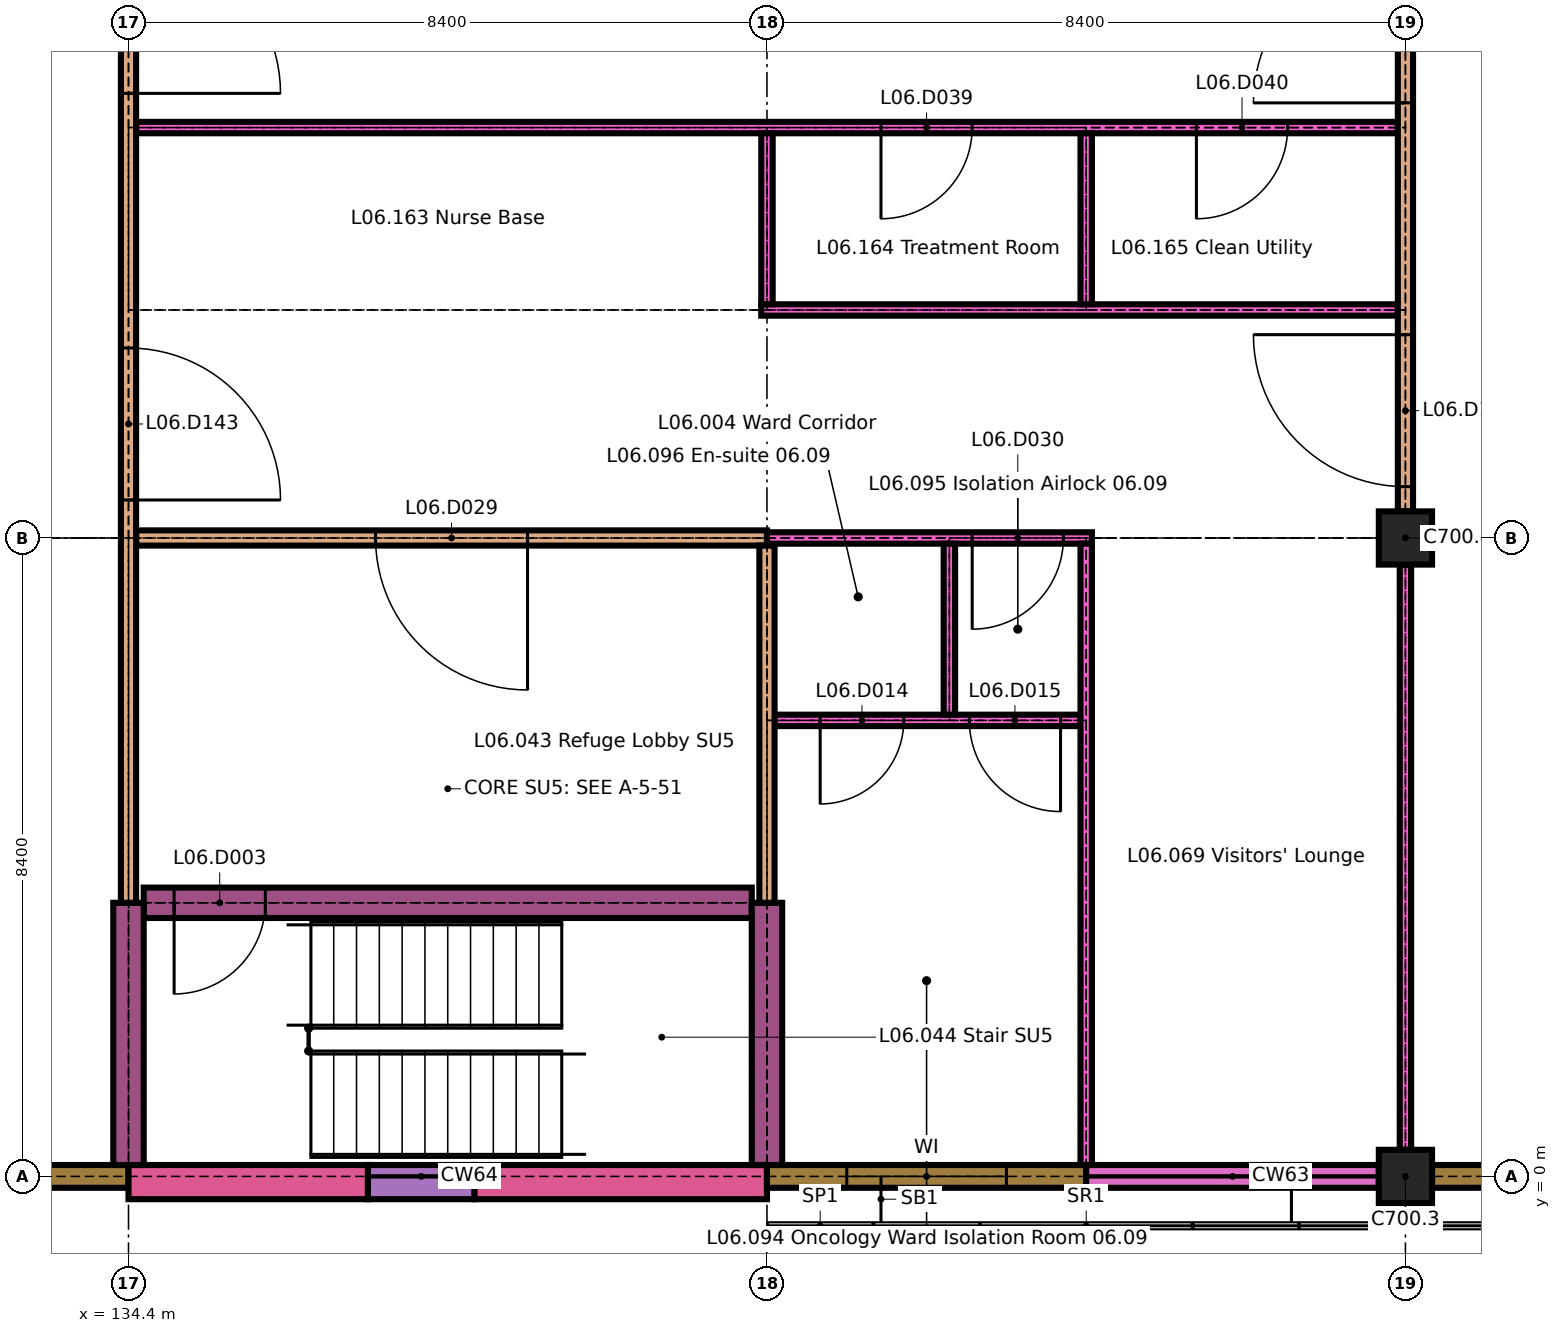
"""IFC4 building model, lengths in metres.
Left out: names, types, materials, properties, quantities, classifications, styles, units other than length and angle.
Written with IfcOpenShell. Run it as: python <this file> out.ifc"""

import sys

from ifc_helpers import new_model, si_unit, direction, frame, frame_2d, origin, origin_2d, place, context, subcontext, project, spatial, rectangle, extrude, element, fill, save


model = new_model("IFC4")
c1 = context("Model", 3, precision=1e-05, world=origin(), true_north=direction((0.0, 1.0)))
c2 = subcontext(c1, "Body", "Model", "MODEL_VIEW")
j1 = project(units=[si_unit("LENGTHUNIT", "METRE"), si_unit("PLANEANGLEUNIT", "RADIAN")], contexts=[c1])
p1 = place(None, origin())
s1 = spatial("IfcSite", under=j1, at=p1, CompositionType="ELEMENT")
p2 = place(p1, origin())
s2 = spatial("IfcBuilding", under=s1, at=p2, CompositionType="ELEMENT")
p3 = place(p2, frame((0.0, 0.0, 26.1)))
s3 = spatial("IfcBuildingStorey", under=s2, at=p3, CompositionType="ELEMENT", Elevation=26.1)
p4 = place(p3, frame((151.2, 0.0, 0.0), z_axis=(0.0, 0.0, 1.0), x_axis=(1.0, 0.0, 0.0)))
e1 = element("IfcColumn", 1, at=p4, inside=s3, PredefinedType="COLUMN", context=c2, shape_type="SweptSolid", body=[
    extrude(rectangle(XDim=0.7, YDim=0.7, at=origin_2d()), origin(), (0.0, 0.0, 1.0), 3.2),
])
p5 = place(p3, frame((151.2, 8.4, 0.0), z_axis=(0.0, 0.0, 1.0), x_axis=(1.0, 0.0, 0.0)))
e2 = element("IfcColumn", 2, at=p5, inside=s3, PredefinedType="COLUMN", context=c2, shape_type="SweptSolid", body=[
    extrude(rectangle(XDim=0.7, YDim=0.7, at=origin_2d()), origin(), (0.0, 0.0, 1.0), 3.3),
])
p6 = place(p3, frame((133.1, 0.0, 0.0), z_axis=(0.0, 0.0, 1.0), x_axis=(1.0, 0.0, 0.0)))
e3 = element("IfcWall", 3, at=p6, inside=s3, PredefinedType="SOLIDWALL", context=c2, shape_type="SweptSolid", body=[
    extrude(rectangle(XDim=1.3, YDim=0.3, at=frame_2d((0.65, 0.0))), origin(), (0.0, 0.0, 1.0), 2.9),
])
p7 = place(p3, frame((134.4, -0.075, 0.0), z_axis=(0.0, 0.0, 1.0), x_axis=(1.0, 0.0, 0.0)))
e4 = element("IfcWall", 4, at=p7, inside=s3, PredefinedType="SOLIDWALL", context=c2, shape_type="SweptSolid", body=[
    extrude(rectangle(XDim=3.15, YDim=0.45, at=frame_2d((1.575, 0.0))), origin(), (0.0, 0.0, 1.0), 3.3),
])
p8 = place(p3, frame((138.95, -0.075, 0.0), z_axis=(0.0, 0.0, 1.0), x_axis=(1.0, 0.0, 0.0)))
e5 = element("IfcWall", 5, at=p8, inside=s3, PredefinedType="SOLIDWALL", context=c2, shape_type="SweptSolid", body=[
    extrude(rectangle(XDim=3.85, YDim=0.45, at=frame_2d((1.925, 0.0))), origin(), (0.0, 0.0, 1.0), 3.3),
])
p9 = place(p3, frame((137.55, -0.075, 0.0), z_axis=(0.0, 0.0, 1.0), x_axis=(1.0, 0.0, 0.0)))
e6 = element("IfcWall", 6, at=p9, inside=s3, PredefinedType="SOLIDWALL", context=c2, shape_type="SweptSolid", body=[
    extrude(rectangle(XDim=1.4, YDim=0.45, at=frame_2d((0.7, 0.0))), origin(), (0.0, 0.0, 1.0), 0.6),
])
p10 = place(p3, frame((142.8, 0.0, 0.0), z_axis=(0.0, 0.0, 1.0), x_axis=(1.0, 0.0, 0.0)))
e7 = element("IfcWall", 7, at=p10, inside=s3, PredefinedType="SOLIDWALL", context=c2, shape_type="SweptSolid", body=[
    extrude(rectangle(XDim=4.2, YDim=0.3, at=frame_2d((2.1, 0.0))), origin(), (0.0, 0.0, 1.0), 2.9),
])
p11 = place(p10, frame((1.05, 0.0, 0.9)))
e8 = element("IfcOpeningElement", 8, at=p11, cuts=e7, PredefinedType="OPENING", context=c2, shape_type="SweptSolid", body=[
    extrude(rectangle(XDim=2.1, YDim=1.5, at=frame_2d((1.05, 0.75))), frame((0.0, 0.16, 0.0), z_axis=(0.0, -1.0, 0.0), x_axis=(1.0, 0.0, 0.0)), (0.0, 0.0, 1.0), 0.32),
])
p12 = place(p3, frame((147.0, 0.0, 0.0), z_axis=(0.0, 0.0, 1.0), x_axis=(1.0, 0.0, 0.0)))
e9 = element("IfcWall", 9, at=p12, inside=s3, PredefinedType="SOLIDWALL", context=c2, shape_type="SweptSolid", body=[
    extrude(rectangle(XDim=3.85, YDim=0.3, at=frame_2d((1.925, 0.0))), origin(), (0.0, 0.0, 1.0), 0.6),
])
p13 = place(p3, frame((151.55, 0.0, 0.0), z_axis=(0.0, 0.0, 1.0), x_axis=(1.0, 0.0, 0.0)))
e10 = element("IfcWall", 10, at=p13, inside=s3, PredefinedType="SOLIDWALL", context=c2, shape_type="SweptSolid", body=[
    extrude(rectangle(XDim=1.05, YDim=0.3, at=frame_2d((0.525, 0.0))), origin(), (0.0, 0.0, 1.0), 2.9),
])
p14 = place(p3, frame((134.6, 3.6, 0.0), z_axis=(0.0, 0.0, 1.0), x_axis=(1.0, 0.0, 0.0)))
e11 = element("IfcWall", 11, at=p14, inside=s3, PredefinedType="SHEAR", context=c2, shape_type="SweptSolid", body=[
    extrude(rectangle(XDim=8.0, YDim=0.4, at=frame_2d((4.0, 0.0))), origin(), (0.0, 0.0, 1.0), 3.3),
])
p15 = place(p14, frame((0.4, 0.0, 0.0)))
e12 = element("IfcOpeningElement", 12, at=p15, cuts=e11, PredefinedType="OPENING", context=c2, shape_type="SweptSolid", body=[
    extrude(rectangle(XDim=1.2, YDim=2.1, at=frame_2d((0.6, 1.05))), frame((0.0, 0.21, 0.0), z_axis=(0.0, -1.0, 0.0), x_axis=(1.0, 0.0, 0.0)), (0.0, 0.0, 1.0), 0.42),
])
p16 = place(p3, frame((142.9, 6.0, 0.0), z_axis=(0.0, 0.0, 1.0), x_axis=(1.0, 0.0, 0.0)))
e13 = element("IfcWall", 13, at=p16, inside=s3, PredefinedType="PARTITIONING", context=c2, shape_type="SweptSolid", body=[
    extrude(rectangle(XDim=4.025, YDim=0.15, at=frame_2d((2.013, 0.0))), origin(), (0.0, 0.0, 1.0), 3.3),
])
p17 = place(p16, frame((0.6, 0.0, 0.0)))
e14 = element("IfcOpeningElement", 14, at=p17, cuts=e13, PredefinedType="OPENING", context=c2, shape_type="SweptSolid", body=[
    extrude(rectangle(XDim=1.1, YDim=2.1, at=frame_2d((0.55, 1.05))), frame((0.0, 0.085, 0.0), z_axis=(0.0, -1.0, 0.0), x_axis=(1.0, 0.0, 0.0)), (0.0, 0.0, 1.0), 0.17),
])
p18 = place(p16, frame((2.562, 0.0, 0.0)))
e15 = element("IfcOpeningElement", 15, at=p18, cuts=e13, PredefinedType="OPENING", context=c2, shape_type="SweptSolid", body=[
    extrude(rectangle(XDim=1.2, YDim=2.1, at=frame_2d((0.6, 1.05))), frame((0.0, 0.085, 0.0), z_axis=(0.0, -1.0, 0.0), x_axis=(1.0, 0.0, 0.0)), (0.0, 0.0, 1.0), 0.17),
])
p19 = place(p3, frame((134.5, 8.4, 0.0), z_axis=(0.0, 0.0, 1.0), x_axis=(1.0, 0.0, 0.0)))
e16 = element("IfcWall", 16, at=p19, inside=s3, PredefinedType="PARTITIONING", context=c2, shape_type="SweptSolid", body=[
    extrude(rectangle(XDim=8.3, YDim=0.2, at=frame_2d((4.15, 0.0))), origin(), (0.0, 0.0, 1.0), 3.3),
])
p20 = place(p19, frame((3.15, 0.0, 0.0)))
e17 = element("IfcOpeningElement", 17, at=p20, cuts=e16, PredefinedType="OPENING", context=c2, shape_type="SweptSolid", body=[
    extrude(rectangle(XDim=2.0, YDim=2.4, at=frame_2d((1.0, 1.2))), frame((0.0, 0.11, 0.0), z_axis=(0.0, -1.0, 0.0), x_axis=(1.0, 0.0, 0.0)), (0.0, 0.0, 1.0), 0.22),
])
p21 = place(p3, frame((142.8, 8.4, 0.0), z_axis=(0.0, 0.0, 1.0), x_axis=(1.0, 0.0, 0.0)))
e18 = element("IfcWall", 18, at=p21, inside=s3, PredefinedType="PARTITIONING", context=c2, shape_type="SweptSolid", body=[
    extrude(rectangle(XDim=4.275, YDim=0.15, at=frame_2d((2.137, 0.0))), origin(), (0.0, 0.0, 1.0), 3.3),
])
p22 = place(p21, frame((2.7, 0.0, 0.0)))
e19 = element("IfcOpeningElement", 19, at=p22, cuts=e18, PredefinedType="OPENING", context=c2, shape_type="SweptSolid", body=[
    extrude(rectangle(XDim=1.2, YDim=2.1, at=frame_2d((0.6, 1.05))), frame((0.0, 0.085, 0.0), z_axis=(0.0, -1.0, 0.0), x_axis=(1.0, 0.0, 0.0)), (0.0, 0.0, 1.0), 0.17),
])
p23 = place(p3, frame((142.725, 11.4, 0.0), z_axis=(0.0, 0.0, 1.0), x_axis=(1.0, 0.0, 0.0)))
e20 = element("IfcWall", 20, at=p23, inside=s3, PredefinedType="PARTITIONING", context=c2, shape_type="SweptSolid", body=[
    extrude(rectangle(XDim=8.375, YDim=0.15, at=frame_2d((4.188, 0.0))), origin(), (0.0, 0.0, 1.0), 3.3),
])
p24 = place(p3, frame((134.5, 13.8, 0.0), z_axis=(0.0, 0.0, 1.0), x_axis=(1.0, 0.0, 0.0)))
e21 = element("IfcWall", 21, at=p24, inside=s3, PredefinedType="PARTITIONING", context=c2, shape_type="SweptSolid", body=[
    extrude(rectangle(XDim=16.6, YDim=0.15, at=frame_2d((8.3, 0.0))), origin(), (0.0, 0.0, 1.0), 3.3),
])
p25 = place(p24, frame((9.8, 0.0, 0.0)))
e22 = element("IfcOpeningElement", 22, at=p25, cuts=e21, PredefinedType="OPENING", context=c2, shape_type="SweptSolid", body=[
    extrude(rectangle(XDim=1.2, YDim=2.1, at=frame_2d((0.6, 1.05))), frame((0.0, 0.085, 0.0), z_axis=(0.0, -1.0, 0.0), x_axis=(1.0, 0.0, 0.0)), (0.0, 0.0, 1.0), 0.17),
])
p26 = place(p24, frame((13.95, 0.0, 0.0)))
e23 = element("IfcOpeningElement", 23, at=p26, cuts=e21, PredefinedType="OPENING", context=c2, shape_type="SweptSolid", body=[
    extrude(rectangle(XDim=1.2, YDim=2.1, at=frame_2d((0.6, 1.05))), frame((0.0, 0.085, 0.0), z_axis=(0.0, -1.0, 0.0), x_axis=(1.0, 0.0, 0.0)), (0.0, 0.0, 1.0), 0.17),
])
p27 = place(p3, frame((134.4, 0.15, 0.0), z_axis=(0.0, 0.0, 1.0), x_axis=(0.0, 1.0, 0.0)))
e24 = element("IfcWall", 24, at=p27, inside=s3, PredefinedType="SHEAR", context=c2, shape_type="SweptSolid", body=[
    extrude(rectangle(XDim=3.45, YDim=0.4, at=frame_2d((1.725, 0.0))), origin(), (0.0, 0.0, 1.0), 3.3),
])
p28 = place(p3, frame((134.4, 3.6, 0.0), z_axis=(0.0, 0.0, 1.0), x_axis=(0.0, 1.0, 0.0)))
e25 = element("IfcWall", 25, at=p28, inside=s3, PredefinedType="PARTITIONING", context=c2, shape_type="SweptSolid", body=[
    extrude(rectangle(XDim=13.1, YDim=0.2, at=frame_2d((6.55, 0.0))), origin(), (0.0, 0.0, 1.0), 3.3),
])
p29 = place(p28, frame((5.3, 0.0, 0.0)))
e26 = element("IfcOpeningElement", 26, at=p29, cuts=e25, PredefinedType="OPENING", context=c2, shape_type="SweptSolid", body=[
    extrude(rectangle(XDim=2.0, YDim=2.4, at=frame_2d((1.0, 1.2))), frame((0.0, 0.11, 0.0), z_axis=(0.0, -1.0, 0.0), x_axis=(1.0, 0.0, 0.0)), (0.0, 0.0, 1.0), 0.22),
])
p30 = place(p28, frame((10.65, 0.0, 0.0)))
e27 = element("IfcOpeningElement", 27, at=p30, cuts=e25, PredefinedType="OPENING", context=c2, shape_type="SweptSolid", body=[
    extrude(rectangle(XDim=2.0, YDim=2.4, at=frame_2d((1.0, 1.2))), frame((0.0, 0.11, 0.0), z_axis=(0.0, -1.0, 0.0), x_axis=(1.0, 0.0, 0.0)), (0.0, 0.0, 1.0), 0.22),
])
p31 = place(p3, frame((142.8, 0.15, 0.0), z_axis=(0.0, 0.0, 1.0), x_axis=(0.0, 1.0, 0.0)))
e28 = element("IfcWall", 28, at=p31, inside=s3, PredefinedType="SHEAR", context=c2, shape_type="SweptSolid", body=[
    extrude(rectangle(XDim=3.45, YDim=0.4, at=frame_2d((1.725, 0.0))), origin(), (0.0, 0.0, 1.0), 3.3),
])
p32 = place(p3, frame((142.8, 3.6, 0.0), z_axis=(0.0, 0.0, 1.0), x_axis=(0.0, 1.0, 0.0)))
e29 = element("IfcWall", 29, at=p32, inside=s3, PredefinedType="PARTITIONING", context=c2, shape_type="SweptSolid", body=[
    extrude(rectangle(XDim=4.7, YDim=0.2, at=frame_2d((2.35, 0.0))), origin(), (0.0, 0.0, 1.0), 3.3),
])
for number, where, z_axis, x_axis in (
    (30, (142.8, 11.475, 0.0), (0.0, 0.0, 1.0), (0.0, 1.0, 0.0)),
    (31, (145.2, 6.075, 0.0), (0.0, 0.0, 1.0), (0.0, 1.0, 0.0)),
):
    element("IfcWall", number, at=place(p3, frame(where, z_axis=z_axis, x_axis=x_axis)), inside=s3, PredefinedType="PARTITIONING", context=c2, shape_type="SweptSolid", body=[
        extrude(rectangle(XDim=2.25, YDim=0.15, at=frame_2d((1.125, 0.0))), origin(), (0.0, 0.0, 1.0), 3.3),
    ])
p33 = place(p3, frame((147.0, 0.15, 0.0), z_axis=(0.0, 0.0, 1.0), x_axis=(0.0, 1.0, 0.0)))
e32 = element("IfcWall", 32, at=p33, inside=s3, PredefinedType="PARTITIONING", context=c2, shape_type="SweptSolid", body=[
    extrude(rectangle(XDim=8.175, YDim=0.15, at=frame_2d((4.087, 0.0))), origin(), (0.0, 0.0, 1.0), 3.3),
])
p34 = place(p3, frame((147.0, 11.475, 0.0), z_axis=(0.0, 0.0, 1.0), x_axis=(0.0, 1.0, 0.0)))
e33 = element("IfcWall", 33, at=p34, inside=s3, PredefinedType="PARTITIONING", context=c2, shape_type="SweptSolid", body=[
    extrude(rectangle(XDim=2.25, YDim=0.15, at=frame_2d((1.125, 0.0))), origin(), (0.0, 0.0, 1.0), 3.3),
])
p35 = place(p3, frame((151.2, 0.35, 0.0), z_axis=(0.0, 0.0, 1.0), x_axis=(0.0, 1.0, 0.0)))
e34 = element("IfcWall", 34, at=p35, inside=s3, PredefinedType="PARTITIONING", context=c2, shape_type="SweptSolid", body=[
    extrude(rectangle(XDim=7.7, YDim=0.15, at=frame_2d((3.85, 0.0))), origin(), (0.0, 0.0, 1.0), 3.3),
])
p36 = place(p3, frame((151.2, 8.75, 0.0), z_axis=(0.0, 0.0, 1.0), x_axis=(0.0, 1.0, 0.0)))
e35 = element("IfcWall", 35, at=p36, inside=s3, PredefinedType="PARTITIONING", context=c2, shape_type="SweptSolid", body=[
    extrude(rectangle(XDim=7.7, YDim=0.2, at=frame_2d((3.85, 0.0))), origin(), (0.0, 0.0, 1.0), 3.3),
])
p37 = place(p36, frame((0.325, 0.0, 0.0)))
e36 = element("IfcOpeningElement", 36, at=p37, cuts=e35, PredefinedType="OPENING", context=c2, shape_type="SweptSolid", body=[
    extrude(rectangle(XDim=2.0, YDim=2.4, at=frame_2d((1.0, 1.2))), frame((0.0, 0.11, 0.0), z_axis=(0.0, -1.0, 0.0), x_axis=(1.0, 0.0, 0.0)), (0.0, 0.0, 1.0), 0.22),
])
p38 = place(p36, frame((5.375, 0.0, 0.0)))
e37 = element("IfcOpeningElement", 37, at=p38, cuts=e35, PredefinedType="OPENING", context=c2, shape_type="SweptSolid", body=[
    extrude(rectangle(XDim=2.0, YDim=2.4, at=frame_2d((1.0, 1.2))), frame((0.0, 0.11, 0.0), z_axis=(0.0, -1.0, 0.0), x_axis=(1.0, 0.0, 0.0)), (0.0, 0.0, 1.0), 0.22),
])
p39 = place(p11, origin())
e38 = element("IfcWindow", 38, at=p39, inside=s3, PartitioningType="SINGLE_PANEL", PredefinedType="WINDOW", context=c2, shape_type="SweptSolid", body=[
    extrude(rectangle(XDim=2.1, YDim=1.5, at=frame_2d((1.05, 0.75))), frame((0.0, 0.045, 0.0), z_axis=(0.0, -1.0, 0.0), x_axis=(1.0, 0.0, 0.0)), (0.0, 0.0, 1.0), 0.09),
])
fill(e8, e38)
p40 = place(p15, origin())
e39 = element("IfcDoor", 39, at=p40, inside=s3, OperationType="SINGLE_SWING_LEFT", PredefinedType="DOOR", context=c2, shape_type="SweptSolid", body=[
    extrude(rectangle(XDim=1.2, YDim=2.1, at=frame_2d((0.6, 1.05))), frame((0.0, 0.025, 0.0), z_axis=(0.0, -1.0, 0.0), x_axis=(1.0, 0.0, 0.0)), (0.0, 0.0, 1.0), 0.05),
])
fill(e12, e39)
p41 = place(p17, origin())
e40 = element("IfcDoor", 40, at=p41, inside=s3, OperationType="SINGLE_SWING_LEFT", PredefinedType="DOOR", context=c2, shape_type="SweptSolid", body=[
    extrude(rectangle(XDim=1.1, YDim=2.1, at=frame_2d((0.55, 1.05))), frame((0.0, 0.025, 0.0), z_axis=(0.0, -1.0, 0.0), x_axis=(1.0, 0.0, 0.0)), (0.0, 0.0, 1.0), 0.05),
])
fill(e14, e40)
p42 = place(p18, origin())
e41 = element("IfcDoor", 41, at=p42, inside=s3, OperationType="SINGLE_SWING_RIGHT", PredefinedType="DOOR", context=c2, shape_type="SweptSolid", body=[
    extrude(rectangle(XDim=1.2, YDim=2.1, at=frame_2d((0.6, 1.05))), frame((0.0, 0.05, 0.0), z_axis=(0.0, -1.0, 0.0), x_axis=(1.0, 0.0, 0.0)), (0.0, 0.0, 1.0), 0.1),
])
fill(e15, e41)
p43 = place(p20, origin())
e42 = element("IfcDoor", 42, at=p43, inside=s3, OperationType="SINGLE_SWING_RIGHT", PredefinedType="DOOR", context=c2, shape_type="SweptSolid", body=[
    extrude(rectangle(XDim=2.0, YDim=2.4, at=frame_2d((1.0, 1.2))), frame((0.0, 0.03, 0.0), z_axis=(0.0, -1.0, 0.0), x_axis=(1.0, 0.0, 0.0)), (0.0, 0.0, 1.0), 0.06),
])
fill(e17, e42)
p44 = place(p22, origin())
e43 = element("IfcDoor", 43, at=p44, inside=s3, OperationType="SINGLE_SWING_LEFT", PredefinedType="DOOR", context=c2, shape_type="SweptSolid", body=[
    extrude(rectangle(XDim=1.2, YDim=2.1, at=frame_2d((0.6, 1.05))), frame((0.0, 0.05, 0.0), z_axis=(0.0, -1.0, 0.0), x_axis=(1.0, 0.0, 0.0)), (0.0, 0.0, 1.0), 0.1),
])
fill(e19, e43)
p45 = place(p25, origin())
e44 = element("IfcDoor", 44, at=p45, inside=s3, OperationType="SINGLE_SWING_LEFT", PredefinedType="DOOR", context=c2, shape_type="SweptSolid", body=[
    extrude(rectangle(XDim=1.2, YDim=2.1, at=frame_2d((0.6, 1.05))), frame((0.0, 0.025, 0.0), z_axis=(0.0, -1.0, 0.0), x_axis=(1.0, 0.0, 0.0)), (0.0, 0.0, 1.0), 0.05),
])
fill(e22, e44)
p46 = place(p26, origin())
e45 = element("IfcDoor", 45, at=p46, inside=s3, OperationType="SINGLE_SWING_LEFT", PredefinedType="DOOR", context=c2, shape_type="SweptSolid", body=[
    extrude(rectangle(XDim=1.2, YDim=2.1, at=frame_2d((0.6, 1.05))), frame((0.0, 0.025, 0.0), z_axis=(0.0, -1.0, 0.0), x_axis=(1.0, 0.0, 0.0)), (0.0, 0.0, 1.0), 0.05),
])
fill(e23, e45)
p47 = place(p29, origin())
e46 = element("IfcDoor", 46, at=p47, inside=s3, OperationType="SINGLE_SWING_LEFT", PredefinedType="DOOR", context=c2, shape_type="SweptSolid", body=[
    extrude(rectangle(XDim=2.0, YDim=2.4, at=frame_2d((1.0, 1.2))), frame((0.0, 0.03, 0.0), z_axis=(0.0, -1.0, 0.0), x_axis=(1.0, 0.0, 0.0)), (0.0, 0.0, 1.0), 0.06),
])
fill(e26, e46)
p48 = place(p30, origin())
e47 = element("IfcDoor", 47, at=p48, inside=s3, OperationType="SINGLE_SWING_LEFT", PredefinedType="DOOR", context=c2, shape_type="SweptSolid", body=[
    extrude(rectangle(XDim=2.0, YDim=2.4, at=frame_2d((1.0, 1.2))), frame((0.0, 0.03, 0.0), z_axis=(0.0, -1.0, 0.0), x_axis=(1.0, 0.0, 0.0)), (0.0, 0.0, 1.0), 0.06),
])
fill(e27, e47)
p49 = place(p37, origin())
e48 = element("IfcDoor", 48, at=p49, inside=s3, OperationType="SINGLE_SWING_LEFT", PredefinedType="DOOR", context=c2, shape_type="SweptSolid", body=[
    extrude(rectangle(XDim=2.0, YDim=2.4, at=frame_2d((1.0, 1.2))), frame((0.0, 0.03, 0.0), z_axis=(0.0, -1.0, 0.0), x_axis=(1.0, 0.0, 0.0)), (0.0, 0.0, 1.0), 0.06),
])
fill(e36, e48)
p50 = place(p38, origin())
e49 = element("IfcDoor", 49, at=p50, inside=s3, OperationType="SINGLE_SWING_RIGHT", PredefinedType="DOOR", context=c2, shape_type="SweptSolid", body=[
    extrude(rectangle(XDim=2.0, YDim=2.4, at=frame_2d((1.0, 1.2))), frame((0.0, 0.03, 0.0), z_axis=(0.0, -1.0, 0.0), x_axis=(1.0, 0.0, 0.0)), (0.0, 0.0, 1.0), 0.06),
])
fill(e37, e49)
save(model, sys.argv[1])
